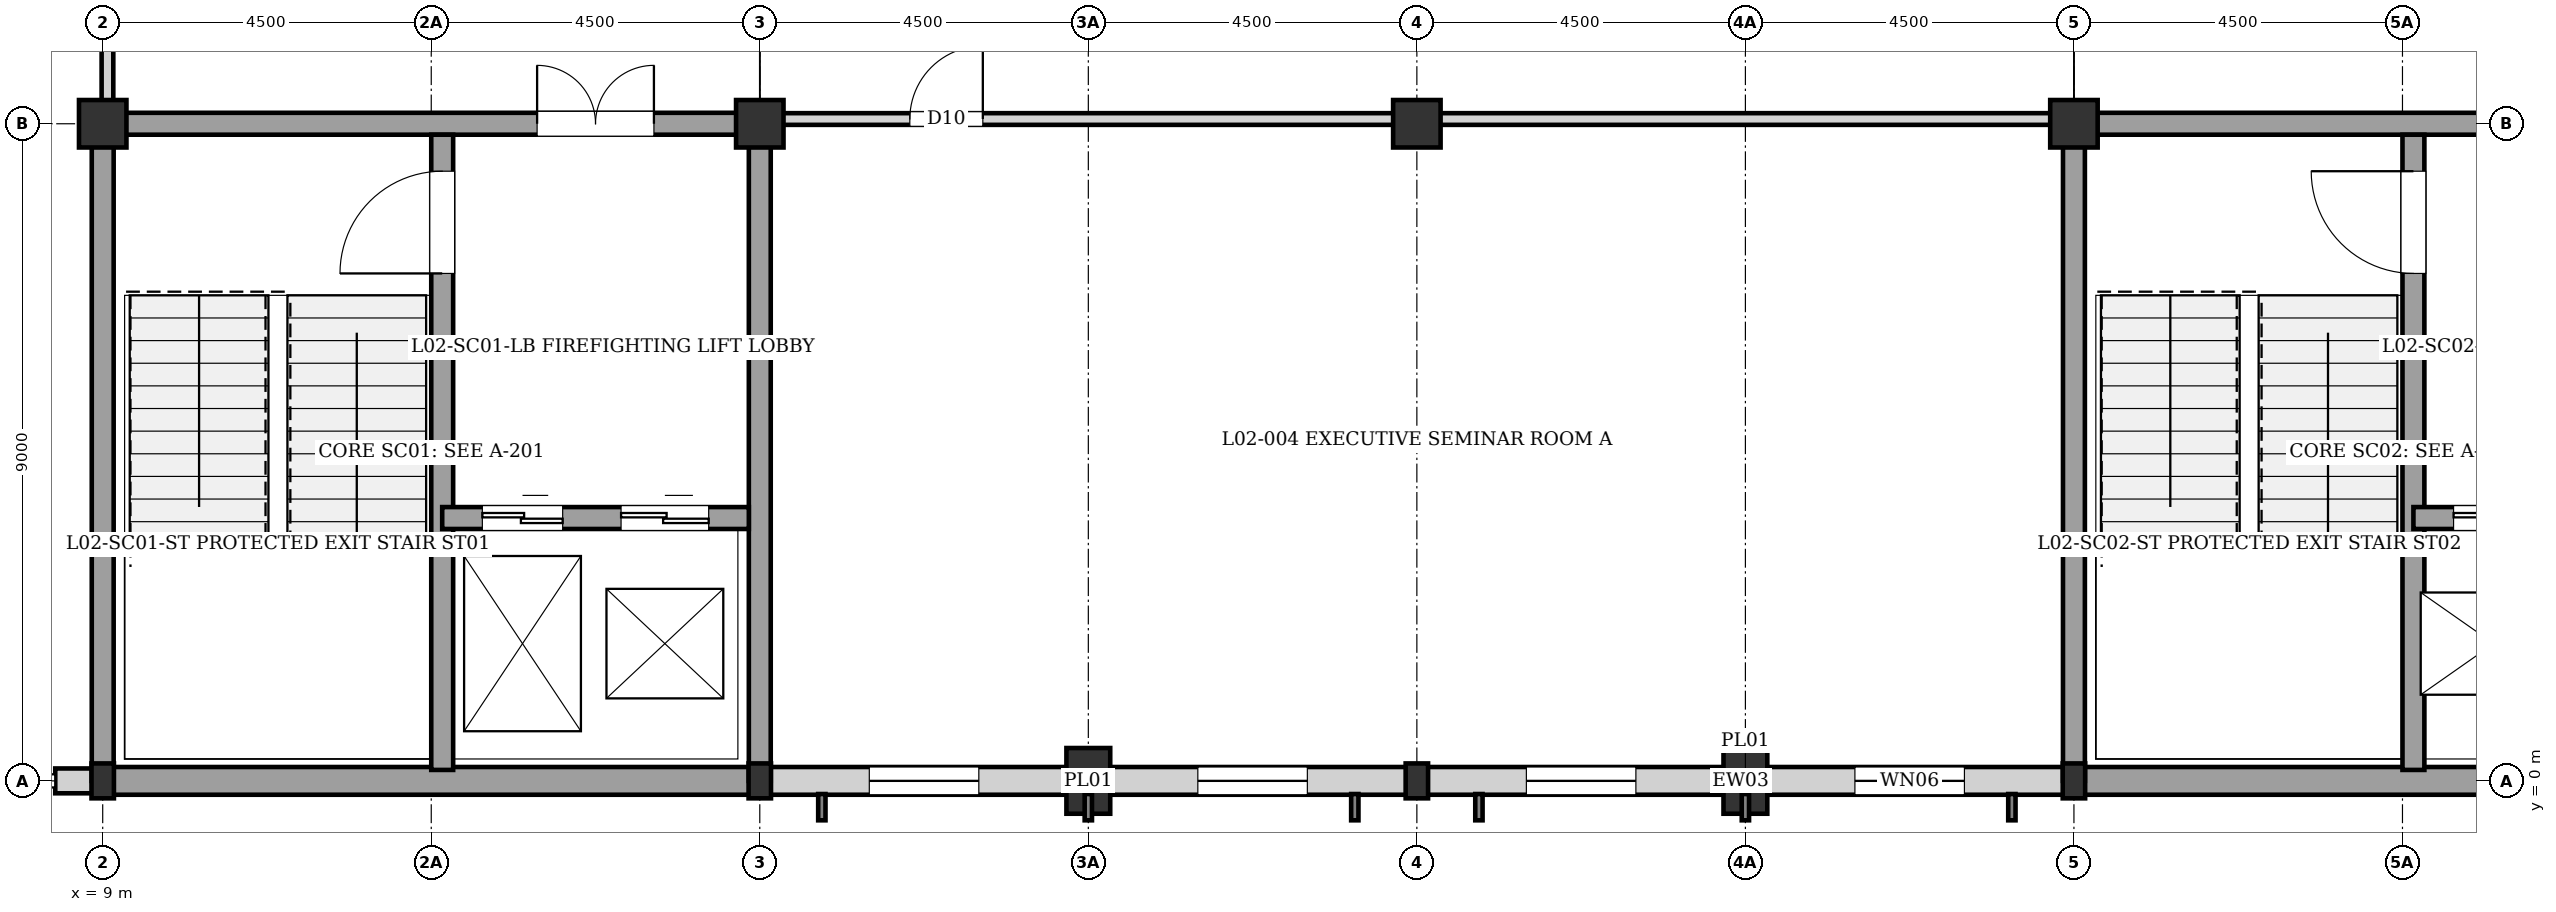
"""IFC4 building model, lengths in metres.
Left out: names, types, materials, properties, quantities, classifications, styles, units other than length and angle.
Written with IfcOpenShell. Run it as: python <this file> out.ifc"""

import sys

from ifc_helpers import new_model, si_unit, direction, frame, frame_2d, origin, origin_2d, place, context, subcontext, project, spatial, rectangle, i_section, extrude, element, fill, save


model = new_model("IFC4")
c1 = context("Model", 3, precision=1e-05, world=origin(), true_north=direction((0.0, 1.0)))
c2 = subcontext(c1, "Body", "Model", "MODEL_VIEW")
j1 = project(units=[si_unit("LENGTHUNIT", "METRE"), si_unit("PLANEANGLEUNIT", "RADIAN")], contexts=[c1])
p1 = place(None, origin())
s1 = spatial("IfcSite", under=j1, at=p1, CompositionType="ELEMENT")
p2 = place(p1, origin())
s2 = spatial("IfcBuilding", under=s1, at=p2, CompositionType="ELEMENT")
p3 = place(p2, frame((0.0, 0.0, 8.16)))
s3 = spatial("IfcBuildingStorey", under=s2, at=p3, CompositionType="ELEMENT", Elevation=8.16)
p4 = place(p3, frame((9.0, 0.0, 0.0), z_axis=(0.0, 0.0, 1.0), x_axis=(1.0, 0.0, 0.0)))
e1 = element("IfcColumn", 1, at=p4, inside=s3, PredefinedType="COLUMN", context=c2, shape_type="SweptSolid", body=[
    extrude(i_section(OverallWidth=0.307, OverallDepth=0.478, WebThickness=0.021, FlangeThickness=0.04, at=origin_2d()), origin(), (0.0, 0.0, 1.0), 3.36),
])
p5 = place(p3, frame((9.0, 9.0, 0.0), z_axis=(0.0, 0.0, 1.0), x_axis=(1.0, 0.0, 0.0)))
e2 = element("IfcColumn", 2, at=p5, inside=s3, PredefinedType="COLUMN", context=c2, shape_type="SweptSolid", body=[
    extrude(rectangle(XDim=0.65, YDim=0.65, at=origin_2d()), origin(), (0.0, 0.0, 1.0), 3.36),
])
p6 = place(p3, frame((18.0, 0.0, 0.0), z_axis=(0.0, 0.0, 1.0), x_axis=(1.0, 0.0, 0.0)))
e3 = element("IfcColumn", 3, at=p6, inside=s3, PredefinedType="COLUMN", context=c2, shape_type="SweptSolid", body=[
    extrude(i_section(OverallWidth=0.307, OverallDepth=0.478, WebThickness=0.021, FlangeThickness=0.04, at=origin_2d()), origin(), (0.0, 0.0, 1.0), 3.36),
])
p7 = place(p3, frame((18.0, 9.0, 0.0), z_axis=(0.0, 0.0, 1.0), x_axis=(1.0, 0.0, 0.0)))
e4 = element("IfcColumn", 4, at=p7, inside=s3, PredefinedType="COLUMN", context=c2, shape_type="SweptSolid", body=[
    extrude(rectangle(XDim=0.65, YDim=0.65, at=origin_2d()), origin(), (0.0, 0.0, 1.0), 3.36),
])
p8 = place(p3, frame((27.0, 0.0, 0.0), z_axis=(0.0, 0.0, 1.0), x_axis=(1.0, 0.0, 0.0)))
e5 = element("IfcColumn", 5, at=p8, inside=s3, PredefinedType="COLUMN", context=c2, shape_type="SweptSolid", body=[
    extrude(i_section(OverallWidth=0.307, OverallDepth=0.478, WebThickness=0.021, FlangeThickness=0.04, at=origin_2d()), origin(), (0.0, 0.0, 1.0), 3.36),
])
p9 = place(p3, frame((27.0, 9.0, 0.0), z_axis=(0.0, 0.0, 1.0), x_axis=(1.0, 0.0, 0.0)))
e6 = element("IfcColumn", 6, at=p9, inside=s3, PredefinedType="COLUMN", context=c2, shape_type="SweptSolid", body=[
    extrude(rectangle(XDim=0.65, YDim=0.65, at=origin_2d()), origin(), (0.0, 0.0, 1.0), 3.36),
])
p10 = place(p3, frame((36.0, 0.0, 0.0), z_axis=(0.0, 0.0, 1.0), x_axis=(1.0, 0.0, 0.0)))
e7 = element("IfcColumn", 7, at=p10, inside=s3, PredefinedType="COLUMN", context=c2, shape_type="SweptSolid", body=[
    extrude(i_section(OverallWidth=0.307, OverallDepth=0.478, WebThickness=0.021, FlangeThickness=0.04, at=origin_2d()), origin(), (0.0, 0.0, 1.0), 3.36),
])
p11 = place(p3, frame((36.0, 9.0, 0.0), z_axis=(0.0, 0.0, 1.0), x_axis=(1.0, 0.0, 0.0)))
e8 = element("IfcColumn", 8, at=p11, inside=s3, PredefinedType="COLUMN", context=c2, shape_type="SweptSolid", body=[
    extrude(rectangle(XDim=0.65, YDim=0.65, at=origin_2d()), origin(), (0.0, 0.0, 1.0), 3.36),
])
for number, where, z_axis, x_axis in (
    (9, (22.5, 0.0, 0.0), (0.0, 0.0, 1.0), (1.0, 0.0, 0.0)),
    (10, (31.5, 0.0, 0.0), (0.0, 0.0, 1.0), (1.0, 0.0, 0.0)),
):
    element("IfcColumn", number, at=place(p3, frame(where, z_axis=z_axis, x_axis=x_axis)), inside=s3, PredefinedType="PILASTER", context=c2, shape_type="SweptSolid", body=[
        extrude(rectangle(XDim=0.6, YDim=0.9, at=origin_2d()), origin(), (0.0, 0.0, 1.0), 3.36),
    ])
p12 = place(p3, frame((45.0, 0.0, 0.0), z_axis=(0.0, 0.0, 1.0), x_axis=(-1.0, 0.0, 0.0)))
e11 = element("IfcWall", 11, at=p12, inside=s3, PredefinedType="SOLIDWALL", context=c2, shape_type="SweptSolid", body=[
    extrude(rectangle(XDim=9.0, YDim=0.38, at=frame_2d((4.5, 0.0))), origin(), (0.0, 0.0, 1.0), 3.14),
])
p13 = place(p3, frame((35.87, 0.0, 0.0), z_axis=(0.0, 0.0, 1.0), x_axis=(-1.0, 0.0, 0.0)))
e12 = element("IfcWall", 12, at=p13, inside=s3, PredefinedType="SOLIDWALL", context=c2, shape_type="SweptSolid", body=[
    extrude(rectangle(XDim=8.87, YDim=0.38, at=frame_2d((4.435, 0.0))), origin(), (0.0, 0.0, 1.0), 2.7),
])
p14 = place(p13, frame((1.37, 0.0, 0.35)))
e13 = element("IfcOpeningElement", 13, at=p14, cuts=e12, PredefinedType="OPENING", context=c2, shape_type="SweptSolid", body=[
    extrude(rectangle(XDim=1.5, YDim=1.8, at=frame_2d((0.75, 0.9))), frame((0.0, 0.2, 0.0), z_axis=(0.0, -1.0, 0.0), x_axis=(1.0, 0.0, 0.0)), (0.0, 0.0, 1.0), 0.4),
])
p15 = place(p13, frame((5.87, 0.0, 0.35)))
e14 = element("IfcOpeningElement", 14, at=p15, cuts=e12, PredefinedType="OPENING", context=c2, shape_type="SweptSolid", body=[
    extrude(rectangle(XDim=1.5, YDim=1.8, at=frame_2d((0.75, 0.9))), frame((0.0, 0.2, 0.0), z_axis=(0.0, -1.0, 0.0), x_axis=(1.0, 0.0, 0.0)), (0.0, 0.0, 1.0), 0.4),
])
p16 = place(p3, frame((27.0, 0.0, 0.0), z_axis=(0.0, 0.0, 1.0), x_axis=(-1.0, 0.0, 0.0)))
e15 = element("IfcWall", 15, at=p16, inside=s3, PredefinedType="SOLIDWALL", context=c2, shape_type="SweptSolid", body=[
    extrude(rectangle(XDim=8.87, YDim=0.38, at=frame_2d((4.435, 0.0))), origin(), (0.0, 0.0, 1.0), 2.74),
])
p17 = place(p16, frame((1.5, 0.0, 0.35)))
e16 = element("IfcOpeningElement", 16, at=p17, cuts=e15, PredefinedType="OPENING", context=c2, shape_type="SweptSolid", body=[
    extrude(rectangle(XDim=1.5, YDim=1.8, at=frame_2d((0.75, 0.9))), frame((0.0, 0.2, 0.0), z_axis=(0.0, -1.0, 0.0), x_axis=(1.0, 0.0, 0.0)), (0.0, 0.0, 1.0), 0.4),
])
p18 = place(p16, frame((6.0, 0.0, 0.35)))
e17 = element("IfcOpeningElement", 17, at=p18, cuts=e15, PredefinedType="OPENING", context=c2, shape_type="SweptSolid", body=[
    extrude(rectangle(XDim=1.5, YDim=1.8, at=frame_2d((0.75, 0.9))), frame((0.0, 0.2, 0.0), z_axis=(0.0, -1.0, 0.0), x_axis=(1.0, 0.0, 0.0)), (0.0, 0.0, 1.0), 0.4),
])
p19 = place(p3, frame((18.0, 0.0, 0.0), z_axis=(0.0, 0.0, 1.0), x_axis=(-1.0, 0.0, 0.0)))
e18 = element("IfcWall", 18, at=p19, inside=s3, PredefinedType="SOLIDWALL", context=c2, shape_type="SweptSolid", body=[
    extrude(rectangle(XDim=9.0, YDim=0.38, at=frame_2d((4.5, 0.0))), origin(), (0.0, 0.0, 1.0), 3.14),
])
p20 = place(p3, frame((8.87, 0.0, 0.0), z_axis=(0.0, 0.0, 1.0), x_axis=(-1.0, 0.0, 0.0)))
e19 = element("IfcWall", 19, at=p20, inside=s3, PredefinedType="SOLIDWALL", context=c2, shape_type="SweptSolid", body=[
    extrude(rectangle(XDim=0.52, YDim=0.34, at=frame_2d((0.26, 0.0))), origin(), (0.0, 0.0, 1.0), 2.87),
])
p21 = place(p3, frame((18.0, 0.0, 0.0), z_axis=(0.0, 0.0, 1.0), x_axis=(0.0, 1.0, 0.0)))
e20 = element("IfcWall", 20, at=p21, inside=s3, PredefinedType="SHEAR", context=c2, shape_type="SweptSolid", body=[
    extrude(rectangle(XDim=9.0, YDim=0.3, at=frame_2d((4.5, 0.0))), origin(), (0.0, 0.0, 1.0), 3.14),
])
p22 = place(p3, frame((9.0, 9.0, 0.0), z_axis=(0.0, 0.0, 1.0), x_axis=(1.0, 0.0, 0.0)))
e21 = element("IfcWall", 21, at=p22, inside=s3, PredefinedType="SHEAR", context=c2, shape_type="SweptSolid", body=[
    extrude(rectangle(XDim=9.0, YDim=0.3, at=frame_2d((4.5, 0.0))), origin(), (0.0, 0.0, 1.0), 3.14),
])
p23 = place(p22, frame((5.95, 0.0, 0.0)))
e22 = element("IfcOpeningElement", 22, at=p23, cuts=e21, PredefinedType="OPENING", context=c2, shape_type="SweptSolid", body=[
    extrude(rectangle(XDim=1.6, YDim=2.1, at=frame_2d((0.8, 1.05))), frame((0.0, 0.16, 0.0), z_axis=(0.0, -1.0, 0.0), x_axis=(1.0, 0.0, 0.0)), (0.0, 0.0, 1.0), 0.32),
])
p24 = place(p3, frame((9.0, 0.0, 0.0), z_axis=(0.0, 0.0, 1.0), x_axis=(0.0, 1.0, 0.0)))
e23 = element("IfcWall", 23, at=p24, inside=s3, PredefinedType="SHEAR", context=c2, shape_type="SweptSolid", body=[
    extrude(rectangle(XDim=9.0, YDim=0.3, at=frame_2d((4.5, 0.0))), origin(), (0.0, 0.0, 1.0), 3.14),
])
p25 = place(p3, frame((13.65, 0.15, 0.0), z_axis=(0.0, 0.0, 1.0), x_axis=(0.0, 1.0, 0.0)))
e24 = element("IfcWall", 24, at=p25, inside=s3, PredefinedType="SHEAR", context=c2, shape_type="SweptSolid", body=[
    extrude(rectangle(XDim=8.7, YDim=0.3, at=frame_2d((4.35, 0.0))), origin(), (0.0, 0.0, 1.0), 3.14),
])
p26 = place(p25, frame((6.8, 0.0, 0.0)))
e25 = element("IfcOpeningElement", 25, at=p26, cuts=e24, PredefinedType="OPENING", context=c2, shape_type="SweptSolid", body=[
    extrude(rectangle(XDim=1.4, YDim=2.02, at=frame_2d((0.7, 1.01))), frame((0.0, 0.16, 0.0), z_axis=(0.0, -1.0, 0.0), x_axis=(1.0, 0.0, 0.0)), (0.0, 0.0, 1.0), 0.32),
])
p27 = place(p3, frame((13.65, 3.6, 0.0), z_axis=(0.0, 0.0, 1.0), x_axis=(1.0, 0.0, 0.0)))
e26 = element("IfcWall", 26, at=p27, inside=s3, PredefinedType="SHEAR", context=c2, shape_type="SweptSolid", body=[
    extrude(rectangle(XDim=4.2, YDim=0.3, at=frame_2d((2.1, 0.0))), origin(), (0.0, 0.0, 1.0), 3.14),
])
p28 = place(p27, frame((0.55, 0.0, 0.0)))
e27 = element("IfcOpeningElement", 27, at=p28, cuts=e26, PredefinedType="OPENING", context=c2, shape_type="SweptSolid", body=[
    extrude(rectangle(XDim=1.1, YDim=2.1, at=frame_2d((0.55, 1.05))), frame((0.0, 0.16, 0.0), z_axis=(0.0, -1.0, 0.0), x_axis=(1.0, 0.0, 0.0)), (0.0, 0.0, 1.0), 0.32),
])
p29 = place(p27, frame((2.45, 0.0, 0.0)))
e28 = element("IfcOpeningElement", 28, at=p29, cuts=e26, PredefinedType="OPENING", context=c2, shape_type="SweptSolid", body=[
    extrude(rectangle(XDim=1.2, YDim=2.2, at=frame_2d((0.6, 1.1))), frame((0.0, 0.16, 0.0), z_axis=(0.0, -1.0, 0.0), x_axis=(1.0, 0.0, 0.0)), (0.0, 0.0, 1.0), 0.32),
])
p30 = place(p3, frame((36.0, 9.0, 0.0), z_axis=(0.0, 0.0, 1.0), x_axis=(1.0, 0.0, 0.0)))
e29 = element("IfcWall", 29, at=p30, inside=s3, PredefinedType="SHEAR", context=c2, shape_type="SweptSolid", body=[
    extrude(rectangle(XDim=9.0, YDim=0.3, at=frame_2d((4.5, 0.0))), origin(), (0.0, 0.0, 1.0), 3.14),
])
p31 = place(p30, frame((5.95, 0.0, 0.0)))
e30 = element("IfcOpeningElement", 30, at=p31, cuts=e29, PredefinedType="OPENING", context=c2, shape_type="SweptSolid", body=[
    extrude(rectangle(XDim=1.6, YDim=2.1, at=frame_2d((0.8, 1.05))), frame((0.0, 0.16, 0.0), z_axis=(0.0, -1.0, 0.0), x_axis=(1.0, 0.0, 0.0)), (0.0, 0.0, 1.0), 0.32),
])
p32 = place(p3, frame((36.0, 0.0, 0.0), z_axis=(0.0, 0.0, 1.0), x_axis=(0.0, 1.0, 0.0)))
e31 = element("IfcWall", 31, at=p32, inside=s3, PredefinedType="SHEAR", context=c2, shape_type="SweptSolid", body=[
    extrude(rectangle(XDim=9.0, YDim=0.3, at=frame_2d((4.5, 0.0))), origin(), (0.0, 0.0, 1.0), 3.14),
])
p33 = place(p3, frame((40.65, 0.15, 0.0), z_axis=(0.0, 0.0, 1.0), x_axis=(0.0, 1.0, 0.0)))
e32 = element("IfcWall", 32, at=p33, inside=s3, PredefinedType="SHEAR", context=c2, shape_type="SweptSolid", body=[
    extrude(rectangle(XDim=8.7, YDim=0.3, at=frame_2d((4.35, 0.0))), origin(), (0.0, 0.0, 1.0), 3.14),
])
p34 = place(p33, frame((6.8, 0.0, 0.0)))
e33 = element("IfcOpeningElement", 33, at=p34, cuts=e32, PredefinedType="OPENING", context=c2, shape_type="SweptSolid", body=[
    extrude(rectangle(XDim=1.4, YDim=2.02, at=frame_2d((0.7, 1.01))), frame((0.0, 0.16, 0.0), z_axis=(0.0, -1.0, 0.0), x_axis=(1.0, 0.0, 0.0)), (0.0, 0.0, 1.0), 0.32),
])
p35 = place(p3, frame((40.65, 3.6, 0.0), z_axis=(0.0, 0.0, 1.0), x_axis=(1.0, 0.0, 0.0)))
e34 = element("IfcWall", 34, at=p35, inside=s3, PredefinedType="SHEAR", context=c2, shape_type="SweptSolid", body=[
    extrude(rectangle(XDim=4.2, YDim=0.3, at=frame_2d((2.1, 0.0))), origin(), (0.0, 0.0, 1.0), 3.14),
])
p36 = place(p35, frame((0.55, 0.0, 0.0)))
e35 = element("IfcOpeningElement", 35, at=p36, cuts=e34, PredefinedType="OPENING", context=c2, shape_type="SweptSolid", body=[
    extrude(rectangle(XDim=1.1, YDim=2.1, at=frame_2d((0.55, 1.05))), frame((0.0, 0.16, 0.0), z_axis=(0.0, -1.0, 0.0), x_axis=(1.0, 0.0, 0.0)), (0.0, 0.0, 1.0), 0.32),
])
p37 = place(p35, frame((2.45, 0.0, 0.0)))
e36 = element("IfcOpeningElement", 36, at=p37, cuts=e34, PredefinedType="OPENING", context=c2, shape_type="SweptSolid", body=[
    extrude(rectangle(XDim=1.2, YDim=2.2, at=frame_2d((0.6, 1.1))), frame((0.0, 0.16, 0.0), z_axis=(0.0, -1.0, 0.0), x_axis=(1.0, 0.0, 0.0)), (0.0, 0.0, 1.0), 0.32),
])
p38 = place(p3, frame((9.065, 9.155, 0.0), z_axis=(0.0, 0.0, 1.0), x_axis=(0.0, 1.0, 0.0)))
e37 = element("IfcWall", 37, at=p38, inside=s3, PredefinedType="PARTITIONING", context=c2, shape_type="SweptSolid", body=[
    extrude(rectangle(XDim=2.775, YDim=0.16, at=frame_2d((1.387, 0.0))), origin(), (0.0, 0.0, 1.0), 2.41),
])
p39 = place(p3, frame((18.155, 9.065, 0.0), z_axis=(0.0, 0.0, 1.0), x_axis=(1.0, 0.0, 0.0)))
e38 = element("IfcWall", 38, at=p39, inside=s3, PredefinedType="PARTITIONING", context=c2, shape_type="SweptSolid", body=[
    extrude(rectangle(XDim=8.825, YDim=0.16, at=frame_2d((4.413, 0.0))), origin(), (0.0, 0.0, 1.0), 2.81),
])
p40 = place(p39, frame((1.9, 0.0, 0.0)))
e39 = element("IfcOpeningElement", 39, at=p40, cuts=e38, PredefinedType="OPENING", context=c2, shape_type="SweptSolid", body=[
    extrude(rectangle(XDim=1.0, YDim=2.1, at=frame_2d((0.5, 1.05))), frame((0.0, 0.09, 0.0), z_axis=(0.0, -1.0, 0.0), x_axis=(1.0, 0.0, 0.0)), (0.0, 0.0, 1.0), 0.18),
])
p41 = place(p3, frame((26.98, 9.065, 0.0), z_axis=(0.0, 0.0, 1.0), x_axis=(1.0, 0.0, 0.0)))
e40 = element("IfcWall", 40, at=p41, inside=s3, PredefinedType="PARTITIONING", context=c2, shape_type="SweptSolid", body=[
    extrude(rectangle(XDim=8.865, YDim=0.16, at=frame_2d((4.433, 0.0))), origin(), (0.0, 0.0, 1.0), 2.77),
])
p42 = place(p14, origin())
e41 = element("IfcWindow", 41, at=p42, inside=s3, PartitioningType="SINGLE_PANEL", PredefinedType="WINDOW", context=c2, shape_type="SweptSolid", body=[
    extrude(rectangle(XDim=1.5, YDim=1.8, at=frame_2d((0.75, 0.9))), frame((0.0, 0.03, 0.0), z_axis=(0.0, -1.0, 0.0), x_axis=(1.0, 0.0, 0.0)), (0.0, 0.0, 1.0), 0.06),
])
fill(e13, e41)
p43 = place(p15, origin())
e42 = element("IfcWindow", 42, at=p43, inside=s3, PartitioningType="SINGLE_PANEL", PredefinedType="WINDOW", context=c2, shape_type="SweptSolid", body=[
    extrude(rectangle(XDim=1.5, YDim=1.8, at=frame_2d((0.75, 0.9))), frame((0.0, 0.03, 0.0), z_axis=(0.0, -1.0, 0.0), x_axis=(1.0, 0.0, 0.0)), (0.0, 0.0, 1.0), 0.06),
])
fill(e14, e42)
p44 = place(p17, origin())
e43 = element("IfcWindow", 43, at=p44, inside=s3, PartitioningType="SINGLE_PANEL", PredefinedType="WINDOW", context=c2, shape_type="SweptSolid", body=[
    extrude(rectangle(XDim=1.5, YDim=1.8, at=frame_2d((0.75, 0.9))), frame((0.0, 0.03, 0.0), z_axis=(0.0, -1.0, 0.0), x_axis=(1.0, 0.0, 0.0)), (0.0, 0.0, 1.0), 0.06),
])
fill(e16, e43)
p45 = place(p18, origin())
e44 = element("IfcWindow", 44, at=p45, inside=s3, PartitioningType="SINGLE_PANEL", PredefinedType="WINDOW", context=c2, shape_type="SweptSolid", body=[
    extrude(rectangle(XDim=1.5, YDim=1.8, at=frame_2d((0.75, 0.9))), frame((0.0, 0.03, 0.0), z_axis=(0.0, -1.0, 0.0), x_axis=(1.0, 0.0, 0.0)), (0.0, 0.0, 1.0), 0.06),
])
fill(e17, e44)
p46 = place(p23, origin())
e45 = element("IfcDoor", 45, at=p46, inside=s3, OperationType="DOUBLE_DOOR_SINGLE_SWING", PredefinedType="DOOR", context=c2, shape_type="SweptSolid", body=[
    extrude(rectangle(XDim=1.6, YDim=2.1, at=frame_2d((0.8, 1.05))), frame((0.0, 0.025, 0.0), z_axis=(0.0, -1.0, 0.0), x_axis=(1.0, 0.0, 0.0)), (0.0, 0.0, 1.0), 0.05),
])
fill(e22, e45)
p47 = place(p26, origin())
e46 = element("IfcDoor", 46, at=p47, inside=s3, OperationType="SINGLE_SWING_LEFT", PredefinedType="DOOR", context=c2, shape_type="SweptSolid", body=[
    extrude(rectangle(XDim=1.4, YDim=2.02, at=frame_2d((0.7, 1.01))), frame((0.0, 0.025, 0.0), z_axis=(0.0, -1.0, 0.0), x_axis=(1.0, 0.0, 0.0)), (0.0, 0.0, 1.0), 0.05),
])
fill(e25, e46)
p48 = place(p28, origin())
e47 = element("IfcDoor", 47, at=p48, inside=s3, OperationType="DOUBLE_DOOR_SLIDING", PredefinedType="DOOR", context=c2, shape_type="SweptSolid", body=[
    extrude(rectangle(XDim=1.1, YDim=2.1, at=frame_2d((0.55, 1.05))), frame((0.0, 0.025, 0.0), z_axis=(0.0, -1.0, 0.0), x_axis=(1.0, 0.0, 0.0)), (0.0, 0.0, 1.0), 0.05),
])
fill(e27, e47)
p49 = place(p29, origin())
e48 = element("IfcDoor", 48, at=p49, inside=s3, OperationType="DOUBLE_DOOR_SLIDING", PredefinedType="DOOR", context=c2, shape_type="SweptSolid", body=[
    extrude(rectangle(XDim=1.2, YDim=2.2, at=frame_2d((0.6, 1.1))), frame((0.0, 0.025, 0.0), z_axis=(0.0, -1.0, 0.0), x_axis=(1.0, 0.0, 0.0)), (0.0, 0.0, 1.0), 0.05),
])
fill(e28, e48)
p50 = place(p34, origin())
e49 = element("IfcDoor", 49, at=p50, inside=s3, OperationType="SINGLE_SWING_RIGHT", PredefinedType="DOOR", context=c2, shape_type="SweptSolid", body=[
    extrude(rectangle(XDim=1.4, YDim=2.02, at=frame_2d((0.7, 1.01))), frame((0.0, 0.025, 0.0), z_axis=(0.0, -1.0, 0.0), x_axis=(1.0, 0.0, 0.0)), (0.0, 0.0, 1.0), 0.05),
])
fill(e33, e49)
p51 = place(p36, origin())
e50 = element("IfcDoor", 50, at=p51, inside=s3, OperationType="DOUBLE_DOOR_SLIDING", PredefinedType="DOOR", context=c2, shape_type="SweptSolid", body=[
    extrude(rectangle(XDim=1.1, YDim=2.1, at=frame_2d((0.55, 1.05))), frame((0.0, 0.025, 0.0), z_axis=(0.0, -1.0, 0.0), x_axis=(1.0, 0.0, 0.0)), (0.0, 0.0, 1.0), 0.05),
])
fill(e35, e50)
p52 = place(p40, origin())
e51 = element("IfcDoor", 51, at=p52, inside=s3, OperationType="SINGLE_SWING_RIGHT", PredefinedType="DOOR", context=c2, shape_type="SweptSolid", body=[
    extrude(rectangle(XDim=1.0, YDim=2.1, at=frame_2d((0.5, 1.05))), frame((0.0, 0.025, 0.0), z_axis=(0.0, -1.0, 0.0), x_axis=(1.0, 0.0, 0.0)), (0.0, 0.0, 1.0), 0.05),
])
fill(e39, e51)
save(model, sys.argv[1])
